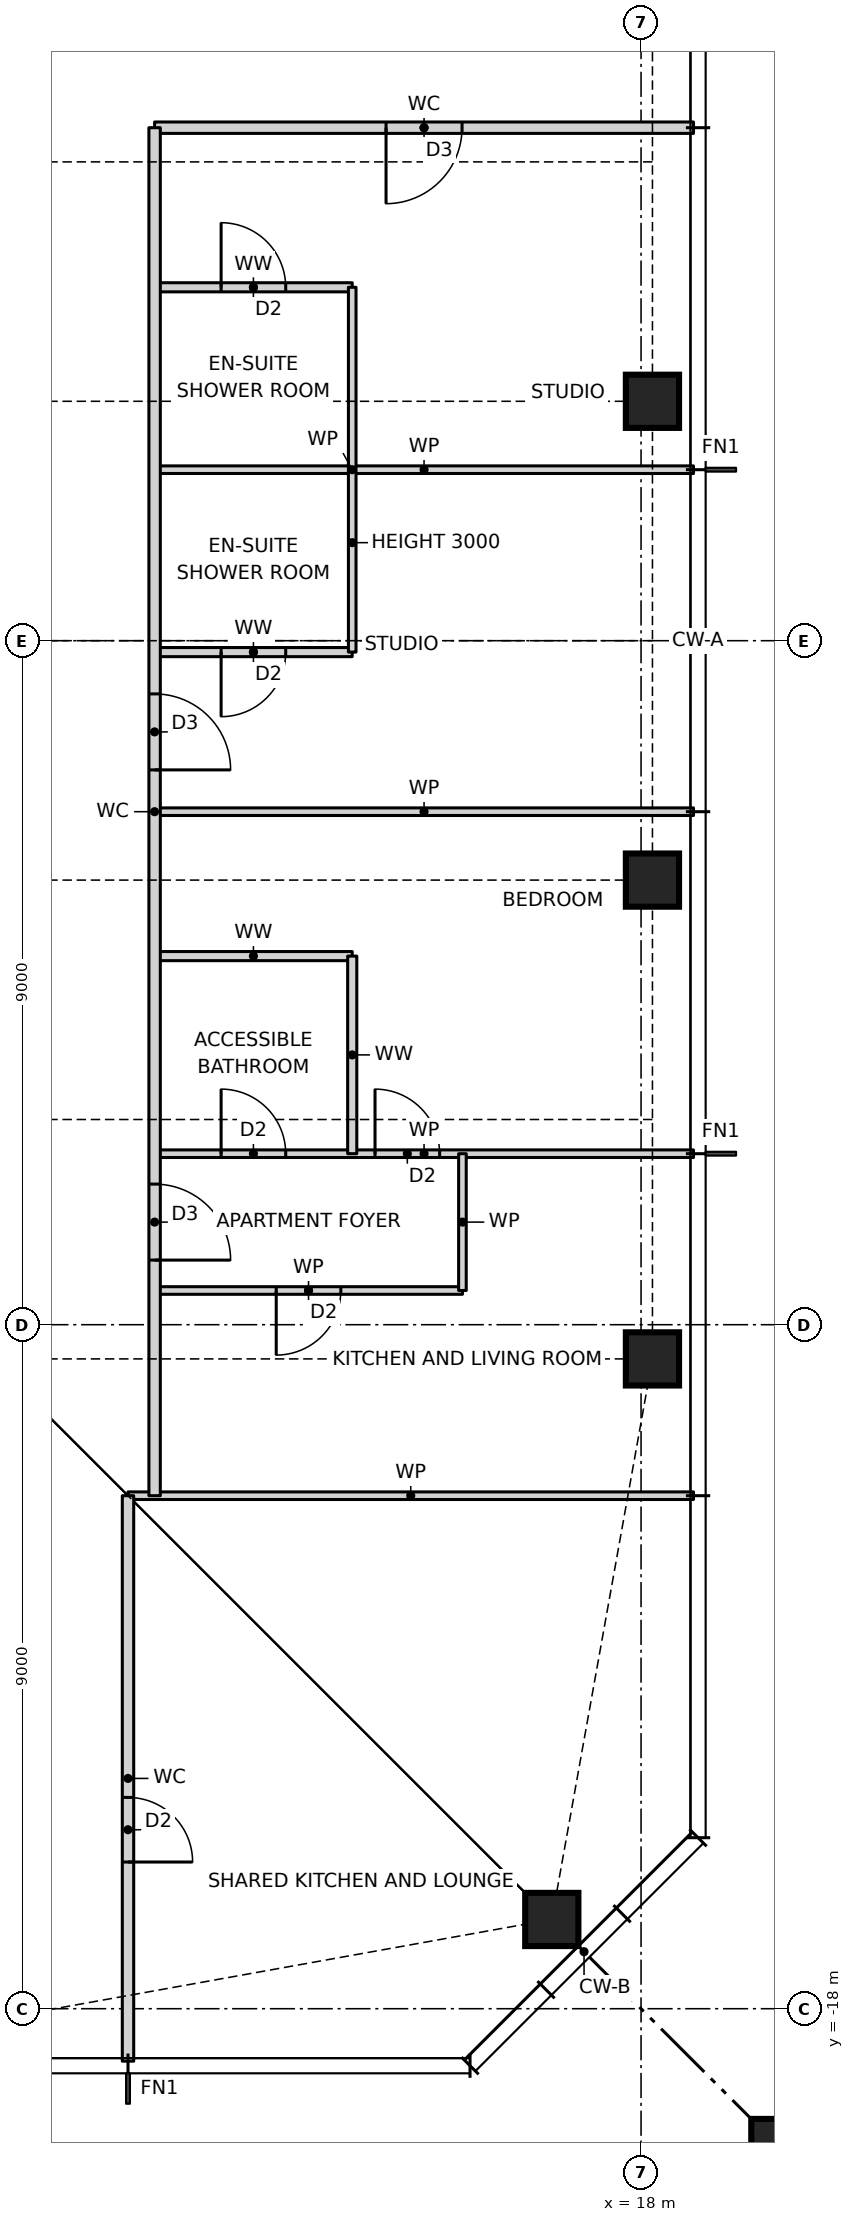
"""IFC4 building model, lengths in metres.
Left out: names, types, materials, properties, quantities, classifications, styles, units other than length and angle.
Written with IfcOpenShell. Run it as: python <this file> out.ifc"""

import sys

from ifc_helpers import new_model, si_unit, direction, frame, frame_2d, origin, origin_2d, place, context, subcontext, project, spatial, rectangle, hollow_rectangle, i_section, extrude, element, fill, save


model = new_model("IFC4")
c1 = context("Model", 3, precision=1e-05, world=origin(), true_north=direction((0.0, 1.0)))
c2 = subcontext(c1, "Body", "Model", "MODEL_VIEW")
j1 = project(units=[si_unit("LENGTHUNIT", "METRE"), si_unit("PLANEANGLEUNIT", "RADIAN")], contexts=[c1])
p1 = place(None, origin())
s1 = spatial("IfcSite", under=j1, at=p1, CompositionType="ELEMENT")
p2 = place(p1, origin())
s2 = spatial("IfcBuilding", under=s1, at=p2, CompositionType="ELEMENT")
p3 = place(p2, frame((0.0, 0.0, 153.0)))
s3 = spatial("IfcBuildingStorey", under=s2, at=p3, CompositionType="ELEMENT", Elevation=153.0)
for number, where, z_axis, x_axis in (
    (1, (16.826, -16.826, 0.0), (0.0, 0.0, 1.0), (1.0, 0.0, 0.0)),
    (2, (18.15, -9.45, 0.0), (0.0, 0.0, 1.0), (1.0, 0.0, 0.0)),
    (3, (18.15, -3.15, 0.0), (0.0, 0.0, 1.0), (1.0, 0.0, 0.0)),
    (4, (18.15, 3.15, 0.0), (0.0, 0.0, 1.0), (1.0, 0.0, 0.0)),
):
    element("IfcColumn", number, at=place(p3, frame(where, z_axis=z_axis, x_axis=x_axis)), inside=s3, PredefinedType="COLUMN", context=c2, shape_type="SweptSolid", body=[
        extrude(hollow_rectangle(XDim=0.7, YDim=0.7, WallThickness=0.06, at=origin_2d()), origin(), (0.0, 0.0, 1.0), 3.5),
    ])
p4 = place(p3, frame((21.65, -21.65, 0.0), z_axis=(0.0, 0.0, 1.0), x_axis=(1.0, 0.0, 0.0)))
e5 = element("IfcColumn", 5, at=p4, inside=s3, PredefinedType="COLUMN", context=c2, shape_type="SweptSolid", body=[
    extrude(rectangle(XDim=4.4, YDim=4.4, at=origin_2d()), origin(), (0.0, 0.0, 1.0), 3.5),
    extrude(i_section(OverallWidth=0.478, OverallDepth=0.599, WebThickness=0.1, FlangeThickness=0.14, at=origin_2d()), origin(), (0.0, 0.0, 1.0), 3.5),
])
p5 = place(p3, frame((11.25, -11.25, 0.0), z_axis=(0.0, 0.0, 1.0), x_axis=(1.0, 0.0, 0.0)))
e6 = element("IfcWall", 6, at=p5, inside=s3, PredefinedType="PARTITIONING", context=c2, shape_type="SweptSolid", body=[
    extrude(rectangle(XDim=7.44, YDim=0.1, at=frame_2d((3.72, 0.0))), origin(), (0.0, 0.0, 1.0), 3.27),
])
p6 = place(p3, frame((11.6, -8.55, 0.0), z_axis=(0.0, 0.0, 1.0), x_axis=(1.0, 0.0, 0.0)))
e7 = element("IfcWall", 7, at=p6, inside=s3, PredefinedType="PARTITIONING", context=c2, shape_type="SweptSolid", body=[
    extrude(rectangle(XDim=4.05, YDim=0.1, at=frame_2d((2.025, 0.0))), origin(), (0.0, 0.0, 1.0), 3.27),
])
p7 = place(p6, frame((1.6, 0.0, 0.0)))
e8 = element("IfcOpeningElement", 8, at=p7, cuts=e7, PredefinedType="OPENING", context=c2, shape_type="SweptSolid", body=[
    extrude(rectangle(XDim=0.85, YDim=2.1, at=frame_2d((0.425, 1.05))), frame((0.0, 0.06, 0.0), z_axis=(0.0, -1.0, 0.0), x_axis=(1.0, 0.0, 0.0)), (0.0, 0.0, 1.0), 0.12),
])
p8 = place(p3, frame((11.6, -6.75, 0.0), z_axis=(0.0, 0.0, 1.0), x_axis=(1.0, 0.0, 0.0)))
e9 = element("IfcWall", 9, at=p8, inside=s3, PredefinedType="PARTITIONING", context=c2, shape_type="SweptSolid", body=[
    extrude(rectangle(XDim=7.09, YDim=0.1, at=frame_2d((3.545, 0.0))), origin(), (0.0, 0.0, 1.0), 3.27),
])
p9 = place(p8, frame((2.9, 0.0, 0.0)))
e10 = element("IfcOpeningElement", 10, at=p9, cuts=e9, PredefinedType="OPENING", context=c2, shape_type="SweptSolid", body=[
    extrude(rectangle(XDim=0.85, YDim=2.1, at=frame_2d((0.425, 1.05))), frame((0.0, 0.06, 0.0), z_axis=(0.0, -1.0, 0.0), x_axis=(1.0, 0.0, 0.0)), (0.0, 0.0, 1.0), 0.12),
])
p10 = place(p8, frame((0.875, 0.0, 0.0)))
e11 = element("IfcOpeningElement", 11, at=p10, cuts=e9, PredefinedType="OPENING", context=c2, shape_type="SweptSolid", body=[
    extrude(rectangle(XDim=0.85, YDim=2.1, at=frame_2d((0.425, 1.05))), frame((0.0, 0.06, 0.0), z_axis=(0.0, -1.0, 0.0), x_axis=(1.0, 0.0, 0.0)), (0.0, 0.0, 1.0), 0.12),
])
p11 = place(p3, frame((11.6, -4.15, 0.0), z_axis=(0.0, 0.0, 1.0), x_axis=(1.0, 0.0, 0.0)))
e12 = element("IfcWall", 12, at=p11, inside=s3, PredefinedType="PARTITIONING", context=c2, shape_type="SweptSolid", body=[
    extrude(rectangle(XDim=2.6, YDim=0.12, at=frame_2d((1.3, 0.0))), origin(), (0.0, 0.0, 1.0), 3.27),
])
p12 = place(p3, frame((11.6, -2.25, 0.0), z_axis=(0.0, 0.0, 1.0), x_axis=(1.0, 0.0, 0.0)))
e13 = element("IfcWall", 13, at=p12, inside=s3, PredefinedType="PARTITIONING", context=c2, shape_type="SweptSolid", body=[
    extrude(rectangle(XDim=7.09, YDim=0.1, at=frame_2d((3.545, 0.0))), origin(), (0.0, 0.0, 1.0), 3.27),
])
p13 = place(p3, frame((11.6, -0.15, 0.0), z_axis=(0.0, 0.0, 1.0), x_axis=(1.0, 0.0, 0.0)))
e14 = element("IfcWall", 14, at=p13, inside=s3, PredefinedType="PARTITIONING", context=c2, shape_type="SweptSolid", body=[
    extrude(rectangle(XDim=2.6, YDim=0.12, at=frame_2d((1.3, 0.0))), origin(), (0.0, 0.0, 1.0), 3.27),
])
p14 = place(p13, frame((0.875, 0.0, 0.0)))
e15 = element("IfcOpeningElement", 15, at=p14, cuts=e14, PredefinedType="OPENING", context=c2, shape_type="SweptSolid", body=[
    extrude(rectangle(XDim=0.85, YDim=2.1, at=frame_2d((0.425, 1.05))), frame((0.0, 0.07, 0.0), z_axis=(0.0, -1.0, 0.0), x_axis=(1.0, 0.0, 0.0)), (0.0, 0.0, 1.0), 0.14),
])
p15 = place(p3, frame((11.6, 2.25, 0.0), z_axis=(0.0, 0.0, 1.0), x_axis=(1.0, 0.0, 0.0)))
e16 = element("IfcWall", 16, at=p15, inside=s3, PredefinedType="PARTITIONING", context=c2, shape_type="SweptSolid", body=[
    extrude(rectangle(XDim=7.09, YDim=0.1, at=frame_2d((3.545, 0.0))), origin(), (0.0, 0.0, 1.0), 3.27),
])
p16 = place(p3, frame((11.6, 4.65, 0.0), z_axis=(0.0, 0.0, 1.0), x_axis=(1.0, 0.0, 0.0)))
e17 = element("IfcWall", 17, at=p16, inside=s3, PredefinedType="PARTITIONING", context=c2, shape_type="SweptSolid", body=[
    extrude(rectangle(XDim=2.6, YDim=0.12, at=frame_2d((1.3, 0.0))), origin(), (0.0, 0.0, 1.0), 3.27),
])
p17 = place(p16, frame((0.875, 0.0, 0.0)))
e18 = element("IfcOpeningElement", 18, at=p17, cuts=e17, PredefinedType="OPENING", context=c2, shape_type="SweptSolid", body=[
    extrude(rectangle(XDim=0.85, YDim=2.1, at=frame_2d((0.425, 1.05))), frame((0.0, 0.07, 0.0), z_axis=(0.0, -1.0, 0.0), x_axis=(1.0, 0.0, 0.0)), (0.0, 0.0, 1.0), 0.14),
])
p18 = place(p3, frame((11.6, 6.75, 0.0), z_axis=(0.0, 0.0, 1.0), x_axis=(1.0, 0.0, 0.0)))
e19 = element("IfcWall", 19, at=p18, inside=s3, PredefinedType="PARTITIONING", context=c2, shape_type="SweptSolid", body=[
    extrude(rectangle(XDim=7.09, YDim=0.15, at=frame_2d((3.545, 0.0))), origin(), (0.0, 0.0, 1.0), 3.27),
])
p19 = place(p18, frame((3.045, 0.0, 0.0)))
e20 = element("IfcOpeningElement", 20, at=p19, cuts=e19, PredefinedType="OPENING", context=c2, shape_type="SweptSolid", body=[
    extrude(rectangle(XDim=1.0, YDim=2.1, at=frame_2d((0.5, 1.05))), frame((0.0, 0.085, 0.0), z_axis=(0.0, -1.0, 0.0), x_axis=(1.0, 0.0, 0.0)), (0.0, 0.0, 1.0), 0.17),
])
p20 = place(p3, frame((15.65, -8.55, 0.0), z_axis=(0.0, 0.0, 1.0), x_axis=(0.0, 1.0, 0.0)))
e21 = element("IfcWall", 21, at=p20, inside=s3, PredefinedType="PARTITIONING", context=c2, shape_type="SweptSolid", body=[
    extrude(rectangle(XDim=1.8, YDim=0.1, at=frame_2d((0.9, 0.0))), origin(), (0.0, 0.0, 1.0), 3.27),
])
p21 = place(p3, frame((14.2, -6.75, 0.0), z_axis=(0.0, 0.0, 1.0), x_axis=(0.0, 1.0, 0.0)))
e22 = element("IfcWall", 22, at=p21, inside=s3, PredefinedType="PARTITIONING", context=c2, shape_type="SweptSolid", body=[
    extrude(rectangle(XDim=2.6, YDim=0.12, at=frame_2d((1.3, 0.0))), origin(), (0.0, 0.0, 1.0), 3.27),
])
p22 = place(p3, frame((14.2, -0.15, 0.0), z_axis=(0.0, 0.0, 1.0), x_axis=(0.0, 1.0, 0.0)))
e23 = element("IfcWall", 23, at=p22, inside=s3, PredefinedType="PARTITIONING", context=c2, shape_type="SweptSolid", body=[
    extrude(rectangle(XDim=4.8, YDim=0.1, at=frame_2d((2.4, 0.0))), origin(), (0.0, 0.0, 1.0), 3.0),
])
p23 = place(p3, frame((11.6, -11.25, 0.0), z_axis=(0.0, 0.0, 1.0), x_axis=(0.0, 1.0, 0.0)))
e24 = element("IfcWall", 24, at=p23, inside=s3, PredefinedType="PARTITIONING", context=c2, shape_type="SweptSolid", body=[
    extrude(rectangle(XDim=18.0, YDim=0.15, at=frame_2d((9.0, 0.0))), origin(), (0.0, 0.0, 1.0), 3.27),
])
p24 = place(p23, frame((3.1, 0.0, 0.0)))
e25 = element("IfcOpeningElement", 25, at=p24, cuts=e24, PredefinedType="OPENING", context=c2, shape_type="SweptSolid", body=[
    extrude(rectangle(XDim=1.0, YDim=2.1, at=frame_2d((0.5, 1.05))), frame((0.0, 0.085, 0.0), z_axis=(0.0, -1.0, 0.0), x_axis=(1.0, 0.0, 0.0)), (0.0, 0.0, 1.0), 0.17),
])
p25 = place(p23, frame((9.55, 0.0, 0.0)))
e26 = element("IfcOpeningElement", 26, at=p25, cuts=e24, PredefinedType="OPENING", context=c2, shape_type="SweptSolid", body=[
    extrude(rectangle(XDim=1.0, YDim=2.1, at=frame_2d((0.5, 1.05))), frame((0.0, 0.085, 0.0), z_axis=(0.0, -1.0, 0.0), x_axis=(1.0, 0.0, 0.0)), (0.0, 0.0, 1.0), 0.17),
])
p26 = place(p3, frame((11.25, -18.69, 0.0), z_axis=(0.0, 0.0, 1.0), x_axis=(0.0, 1.0, 0.0)))
e27 = element("IfcWall", 27, at=p26, inside=s3, PredefinedType="PARTITIONING", context=c2, shape_type="SweptSolid", body=[
    extrude(rectangle(XDim=7.44, YDim=0.15, at=frame_2d((3.72, 0.0))), origin(), (0.0, 0.0, 1.0), 3.27),
])
p27 = place(p26, frame((2.62, 0.0, 0.0)))
e28 = element("IfcOpeningElement", 28, at=p27, cuts=e27, PredefinedType="OPENING", context=c2, shape_type="SweptSolid", body=[
    extrude(rectangle(XDim=0.85, YDim=2.1, at=frame_2d((0.425, 1.05))), frame((0.0, 0.085, 0.0), z_axis=(0.0, -1.0, 0.0), x_axis=(1.0, 0.0, 0.0)), (0.0, 0.0, 1.0), 0.17),
])
p28 = place(p24, frame((1.0, 0.0, 0.0), z_axis=(0.0, 0.0, 1.0), x_axis=(-1.0, 0.0, 0.0)))
e29 = element("IfcDoor", 29, at=p28, inside=s3, OperationType="SINGLE_SWING_RIGHT", PredefinedType="DOOR", context=c2, shape_type="SweptSolid", body=[
    extrude(rectangle(XDim=1.0, YDim=2.1, at=frame_2d((0.5, 1.05))), frame((0.0, 0.025, 0.0), z_axis=(0.0, -1.0, 0.0), x_axis=(1.0, 0.0, 0.0)), (0.0, 0.0, 1.0), 0.05),
])
fill(e25, e29)
p29 = place(p7, frame((0.85, 0.0, 0.0), z_axis=(0.0, 0.0, 1.0), x_axis=(-1.0, 0.0, 0.0)))
e30 = element("IfcDoor", 30, at=p29, inside=s3, OperationType="SINGLE_SWING_RIGHT", PredefinedType="DOOR", context=c2, shape_type="SweptSolid", body=[
    extrude(rectangle(XDim=0.85, YDim=2.1, at=frame_2d((0.425, 1.05))), frame((0.0, 0.025, 0.0), z_axis=(0.0, -1.0, 0.0), x_axis=(1.0, 0.0, 0.0)), (0.0, 0.0, 1.0), 0.05),
])
fill(e8, e30)
p30 = place(p9, origin())
e31 = element("IfcDoor", 31, at=p30, inside=s3, OperationType="SINGLE_SWING_LEFT", PredefinedType="DOOR", context=c2, shape_type="SweptSolid", body=[
    extrude(rectangle(XDim=0.85, YDim=2.1, at=frame_2d((0.425, 1.05))), frame((0.0, 0.025, 0.0), z_axis=(0.0, -1.0, 0.0), x_axis=(1.0, 0.0, 0.0)), (0.0, 0.0, 1.0), 0.05),
])
fill(e10, e31)
p31 = place(p10, origin())
e32 = element("IfcDoor", 32, at=p31, inside=s3, OperationType="SINGLE_SWING_LEFT", PredefinedType="DOOR", context=c2, shape_type="SweptSolid", body=[
    extrude(rectangle(XDim=0.85, YDim=2.1, at=frame_2d((0.425, 1.05))), frame((0.0, 0.025, 0.0), z_axis=(0.0, -1.0, 0.0), x_axis=(1.0, 0.0, 0.0)), (0.0, 0.0, 1.0), 0.05),
])
fill(e11, e32)
p32 = place(p25, frame((1.0, 0.0, 0.0), z_axis=(0.0, 0.0, 1.0), x_axis=(-1.0, 0.0, 0.0)))
e33 = element("IfcDoor", 33, at=p32, inside=s3, OperationType="SINGLE_SWING_RIGHT", PredefinedType="DOOR", context=c2, shape_type="SweptSolid", body=[
    extrude(rectangle(XDim=1.0, YDim=2.1, at=frame_2d((0.5, 1.05))), frame((0.0, 0.025, 0.0), z_axis=(0.0, -1.0, 0.0), x_axis=(1.0, 0.0, 0.0)), (0.0, 0.0, 1.0), 0.05),
])
fill(e26, e33)
p33 = place(p14, frame((0.85, 0.0, 0.0), z_axis=(0.0, 0.0, 1.0), x_axis=(-1.0, 0.0, 0.0)))
e34 = element("IfcDoor", 34, at=p33, inside=s3, OperationType="SINGLE_SWING_RIGHT", PredefinedType="DOOR", context=c2, shape_type="SweptSolid", body=[
    extrude(rectangle(XDim=0.85, YDim=2.1, at=frame_2d((0.425, 1.05))), frame((0.0, 0.025, 0.0), z_axis=(0.0, -1.0, 0.0), x_axis=(1.0, 0.0, 0.0)), (0.0, 0.0, 1.0), 0.05),
])
fill(e15, e34)
p34 = place(p19, frame((1.0, 0.0, 0.0), z_axis=(0.0, 0.0, 1.0), x_axis=(-1.0, 0.0, 0.0)))
e35 = element("IfcDoor", 35, at=p34, inside=s3, OperationType="SINGLE_SWING_RIGHT", PredefinedType="DOOR", context=c2, shape_type="SweptSolid", body=[
    extrude(rectangle(XDim=1.0, YDim=2.1, at=frame_2d((0.5, 1.05))), frame((0.0, 0.025, 0.0), z_axis=(0.0, -1.0, 0.0), x_axis=(1.0, 0.0, 0.0)), (0.0, 0.0, 1.0), 0.05),
])
fill(e20, e35)
p35 = place(p17, origin())
e36 = element("IfcDoor", 36, at=p35, inside=s3, OperationType="SINGLE_SWING_LEFT", PredefinedType="DOOR", context=c2, shape_type="SweptSolid", body=[
    extrude(rectangle(XDim=0.85, YDim=2.1, at=frame_2d((0.425, 1.05))), frame((0.0, 0.025, 0.0), z_axis=(0.0, -1.0, 0.0), x_axis=(1.0, 0.0, 0.0)), (0.0, 0.0, 1.0), 0.05),
])
fill(e18, e36)
p36 = place(p27, frame((0.85, 0.0, 0.0), z_axis=(0.0, 0.0, 1.0), x_axis=(-1.0, 0.0, 0.0)))
e37 = element("IfcDoor", 37, at=p36, inside=s3, OperationType="SINGLE_SWING_RIGHT", PredefinedType="DOOR", context=c2, shape_type="SweptSolid", body=[
    extrude(rectangle(XDim=0.85, YDim=2.1, at=frame_2d((0.425, 1.05))), frame((0.0, 0.025, 0.0), z_axis=(0.0, -1.0, 0.0), x_axis=(1.0, 0.0, 0.0)), (0.0, 0.0, 1.0), 0.05),
])
fill(e28, e37)
save(model, sys.argv[1])
